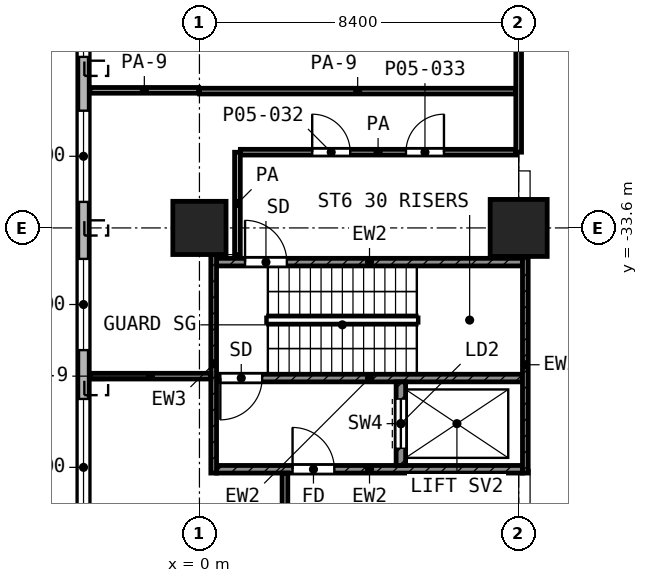
"""IFC4 building model, lengths in metres.
Left out: names, types, materials, properties, quantities, classifications, styles, units other than length and angle.
Written with IfcOpenShell. Run it as: python <this file> out.ifc"""

import sys

from ifc_helpers import new_model, si_unit, direction, frame, frame_2d, origin, origin_2d, place, context, subcontext, project, spatial, rectangle, extrude, element, fill, save


model = new_model("IFC4")
c1 = context("Model", 3, precision=1e-05, world=origin(), true_north=direction((0.0, 1.0)))
c2 = subcontext(c1, "Body", "Model", "MODEL_VIEW")
j1 = project(units=[si_unit("LENGTHUNIT", "METRE"), si_unit("PLANEANGLEUNIT", "RADIAN")], contexts=[c1])
p1 = place(None, origin())
s1 = spatial("IfcSite", under=j1, at=p1, CompositionType="ELEMENT")
p2 = place(p1, origin())
s2 = spatial("IfcBuilding", under=s1, at=p2, CompositionType="ELEMENT")
p3 = place(p2, frame((0.0, 0.0, 23.8)))
s3 = spatial("IfcBuildingStorey", under=s2, at=p3, CompositionType="ELEMENT", Elevation=23.8)
p4 = place(p3, frame((0.0, -33.6, 0.0), z_axis=(0.0, 0.0, 1.0), x_axis=(1.0, 0.0, 0.0)))
e1 = element("IfcColumn", 1, at=p4, inside=s3, PredefinedType="COLUMN", context=c2, shape_type="SweptSolid", body=[
    extrude(rectangle(XDim=1.4, YDim=1.4, at=origin_2d()), origin(), (0.0, 0.0, 1.0), 5.2),
])
p5 = place(p3, frame((8.4, -33.6, 0.0), z_axis=(0.0, 0.0, 1.0), x_axis=(1.0, 0.0, 0.0)))
e2 = element("IfcColumn", 2, at=p5, inside=s3, PredefinedType="COLUMN", context=c2, shape_type="SweptSolid", body=[
    extrude(rectangle(XDim=1.5, YDim=1.5, at=origin_2d()), origin(), (0.0, 0.0, 1.0), 5.2),
])
p6 = place(p3, frame((-3.05, -2.862, 0.0), z_axis=(0.0, 0.0, 1.0), x_axis=(0.0, -1.0, 0.0)))
e3 = element("IfcWall", 3, at=p6, inside=s3, PredefinedType="SOLIDWALL", context=c2, shape_type="SweptSolid", body=[
    extrude(rectangle(XDim=78.276, YDim=0.3, at=frame_2d((39.138, 0.0))), origin(), (0.0, 0.0, 1.0), 4.85),
])
p7 = place(p6, frame((1.638, 0.0, 0.9)))
e4 = element("IfcOpeningElement", 4, at=p7, cuts=e3, PredefinedType="OPENING", context=c2, shape_type="SweptSolid", body=[
    extrude(rectangle(XDim=3.6, YDim=3.0, at=frame_2d((1.8, 1.5))), frame((0.0, 0.16, 0.0), z_axis=(0.0, -1.0, 0.0), x_axis=(1.0, 0.0, 0.0)), (0.0, 0.0, 1.0), 0.32),
])
p8 = place(p6, frame((5.838, 0.0, 0.9)))
e5 = element("IfcOpeningElement", 5, at=p8, cuts=e3, PredefinedType="OPENING", context=c2, shape_type="SweptSolid", body=[
    extrude(rectangle(XDim=3.6, YDim=3.0, at=frame_2d((1.8, 1.5))), frame((0.0, 0.16, 0.0), z_axis=(0.0, -1.0, 0.0), x_axis=(1.0, 0.0, 0.0)), (0.0, 0.0, 1.0), 0.32),
])
p9 = place(p6, frame((10.038, 0.0, 0.9)))
e6 = element("IfcOpeningElement", 6, at=p9, cuts=e3, PredefinedType="OPENING", context=c2, shape_type="SweptSolid", body=[
    extrude(rectangle(XDim=3.6, YDim=3.0, at=frame_2d((1.8, 1.5))), frame((0.0, 0.16, 0.0), z_axis=(0.0, -1.0, 0.0), x_axis=(1.0, 0.0, 0.0)), (0.0, 0.0, 1.0), 0.32),
])
p10 = place(p6, frame((14.238, 0.0, 0.9)))
e7 = element("IfcOpeningElement", 7, at=p10, cuts=e3, PredefinedType="OPENING", context=c2, shape_type="SweptSolid", body=[
    extrude(rectangle(XDim=3.6, YDim=3.0, at=frame_2d((1.8, 1.5))), frame((0.0, 0.16, 0.0), z_axis=(0.0, -1.0, 0.0), x_axis=(1.0, 0.0, 0.0)), (0.0, 0.0, 1.0), 0.32),
])
p11 = place(p6, frame((18.438, 0.0, 0.9)))
e8 = element("IfcOpeningElement", 8, at=p11, cuts=e3, PredefinedType="OPENING", context=c2, shape_type="SweptSolid", body=[
    extrude(rectangle(XDim=3.6, YDim=3.0, at=frame_2d((1.8, 1.5))), frame((0.0, 0.16, 0.0), z_axis=(0.0, -1.0, 0.0), x_axis=(1.0, 0.0, 0.0)), (0.0, 0.0, 1.0), 0.32),
])
p12 = place(p6, frame((22.638, 0.0, 0.9)))
e9 = element("IfcOpeningElement", 9, at=p12, cuts=e3, PredefinedType="OPENING", context=c2, shape_type="SweptSolid", body=[
    extrude(rectangle(XDim=3.6, YDim=3.0, at=frame_2d((1.8, 1.5))), frame((0.0, 0.16, 0.0), z_axis=(0.0, -1.0, 0.0), x_axis=(1.0, 0.0, 0.0)), (0.0, 0.0, 1.0), 0.32),
])
p13 = place(p6, frame((27.653, 0.0, 0.9)))
e10 = element("IfcOpeningElement", 10, at=p13, cuts=e3, PredefinedType="OPENING", context=c2, shape_type="SweptSolid", body=[
    extrude(rectangle(XDim=2.4, YDim=3.0, at=frame_2d((1.2, 1.5))), frame((0.0, 0.16, 0.0), z_axis=(0.0, -1.0, 0.0), x_axis=(1.0, 0.0, 0.0)), (0.0, 0.0, 1.0), 0.32),
])
p14 = place(p6, frame((31.553, 0.0, 0.9)))
e11 = element("IfcOpeningElement", 11, at=p14, cuts=e3, PredefinedType="OPENING", context=c2, shape_type="SweptSolid", body=[
    extrude(rectangle(XDim=2.4, YDim=3.0, at=frame_2d((1.2, 1.5))), frame((0.0, 0.16, 0.0), z_axis=(0.0, -1.0, 0.0), x_axis=(1.0, 0.0, 0.0)), (0.0, 0.0, 1.0), 0.32),
])
p15 = place(p6, frame((35.238, 0.0, 0.9)))
e12 = element("IfcOpeningElement", 12, at=p15, cuts=e3, PredefinedType="OPENING", context=c2, shape_type="SweptSolid", body=[
    extrude(rectangle(XDim=3.6, YDim=3.0, at=frame_2d((1.8, 1.5))), frame((0.0, 0.16, 0.0), z_axis=(0.0, -1.0, 0.0), x_axis=(1.0, 0.0, 0.0)), (0.0, 0.0, 1.0), 0.32),
])
p16 = place(p6, frame((39.438, 0.0, 0.9)))
e13 = element("IfcOpeningElement", 13, at=p16, cuts=e3, PredefinedType="OPENING", context=c2, shape_type="SweptSolid", body=[
    extrude(rectangle(XDim=3.6, YDim=3.0, at=frame_2d((1.8, 1.5))), frame((0.0, 0.16, 0.0), z_axis=(0.0, -1.0, 0.0), x_axis=(1.0, 0.0, 0.0)), (0.0, 0.0, 1.0), 0.32),
])
p17 = place(p6, frame((44.323, 0.0, 0.9)))
e14 = element("IfcOpeningElement", 14, at=p17, cuts=e3, PredefinedType="OPENING", context=c2, shape_type="SweptSolid", body=[
    extrude(rectangle(XDim=2.4, YDim=3.0, at=frame_2d((1.2, 1.5))), frame((0.0, 0.16, 0.0), z_axis=(0.0, -1.0, 0.0), x_axis=(1.0, 0.0, 0.0)), (0.0, 0.0, 1.0), 0.32),
])
p18 = place(p6, frame((48.203, 0.0, 0.9)))
e15 = element("IfcOpeningElement", 15, at=p18, cuts=e3, PredefinedType="OPENING", context=c2, shape_type="SweptSolid", body=[
    extrude(rectangle(XDim=2.4, YDim=3.0, at=frame_2d((1.2, 1.5))), frame((0.0, 0.16, 0.0), z_axis=(0.0, -1.0, 0.0), x_axis=(1.0, 0.0, 0.0)), (0.0, 0.0, 1.0), 0.32),
])
p19 = place(p6, frame((52.038, 0.0, 0.9)))
e16 = element("IfcOpeningElement", 16, at=p19, cuts=e3, PredefinedType="OPENING", context=c2, shape_type="SweptSolid", body=[
    extrude(rectangle(XDim=3.6, YDim=3.0, at=frame_2d((1.8, 1.5))), frame((0.0, 0.16, 0.0), z_axis=(0.0, -1.0, 0.0), x_axis=(1.0, 0.0, 0.0)), (0.0, 0.0, 1.0), 0.32),
])
p20 = place(p6, frame((56.238, 0.0, 0.9)))
e17 = element("IfcOpeningElement", 17, at=p20, cuts=e3, PredefinedType="OPENING", context=c2, shape_type="SweptSolid", body=[
    extrude(rectangle(XDim=3.6, YDim=3.0, at=frame_2d((1.8, 1.5))), frame((0.0, 0.16, 0.0), z_axis=(0.0, -1.0, 0.0), x_axis=(1.0, 0.0, 0.0)), (0.0, 0.0, 1.0), 0.32),
])
p21 = place(p6, frame((60.438, 0.0, 0.9)))
e18 = element("IfcOpeningElement", 18, at=p21, cuts=e3, PredefinedType="OPENING", context=c2, shape_type="SweptSolid", body=[
    extrude(rectangle(XDim=3.6, YDim=3.0, at=frame_2d((1.8, 1.5))), frame((0.0, 0.16, 0.0), z_axis=(0.0, -1.0, 0.0), x_axis=(1.0, 0.0, 0.0)), (0.0, 0.0, 1.0), 0.32),
])
p22 = place(p6, frame((64.638, 0.0, 0.9)))
e19 = element("IfcOpeningElement", 19, at=p22, cuts=e3, PredefinedType="OPENING", context=c2, shape_type="SweptSolid", body=[
    extrude(rectangle(XDim=3.6, YDim=3.0, at=frame_2d((1.8, 1.5))), frame((0.0, 0.16, 0.0), z_axis=(0.0, -1.0, 0.0), x_axis=(1.0, 0.0, 0.0)), (0.0, 0.0, 1.0), 0.32),
])
p23 = place(p6, frame((69.238, 0.0, 0.9)))
e20 = element("IfcOpeningElement", 20, at=p23, cuts=e3, PredefinedType="OPENING", context=c2, shape_type="SweptSolid", body=[
    extrude(rectangle(XDim=1.2, YDim=3.0, at=frame_2d((0.6, 1.5))), frame((0.0, 0.16, 0.0), z_axis=(0.0, -1.0, 0.0), x_axis=(1.0, 0.0, 0.0)), (0.0, 0.0, 1.0), 0.32),
])
p24 = place(p6, frame((73.038, 0.0, 0.9)))
e21 = element("IfcOpeningElement", 21, at=p24, cuts=e3, PredefinedType="OPENING", context=c2, shape_type="SweptSolid", body=[
    extrude(rectangle(XDim=3.6, YDim=3.0, at=frame_2d((1.8, 1.5))), frame((0.0, 0.16, 0.0), z_axis=(0.0, -1.0, 0.0), x_axis=(1.0, 0.0, 0.0)), (0.0, 0.0, 1.0), 0.32),
])
p25 = place(p3, frame((0.375, -40.05, 0.0), z_axis=(0.0, 0.0, 1.0), x_axis=(0.0, 1.0, 0.0)))
e22 = element("IfcWall", 22, at=p25, inside=s3, PredefinedType="SHEAR", context=c2, shape_type="SweptSolid", body=[
    extrude(rectangle(XDim=5.75, YDim=0.15, at=frame_2d((2.875, 0.0))), origin(), (0.0, 0.0, 1.0), 4.85),
])
p26 = place(p3, frame((8.575, -40.05, 0.0), z_axis=(0.0, 0.0, 1.0), x_axis=(0.0, 1.0, 0.0)))
e23 = element("IfcWall", 23, at=p26, inside=s3, PredefinedType="SHEAR", context=c2, shape_type="SweptSolid", body=[
    extrude(rectangle(XDim=5.7, YDim=0.15, at=frame_2d((2.85, 0.0))), origin(), (0.0, 0.0, 1.0), 4.85),
])
p27 = place(p3, frame((0.45, -34.5, 0.0), z_axis=(0.0, 0.0, 1.0), x_axis=(1.0, 0.0, 0.0)))
e24 = element("IfcWall", 24, at=p27, inside=s3, PredefinedType="SHEAR", context=c2, shape_type="SweptSolid", body=[
    extrude(rectangle(XDim=8.05, YDim=0.2, at=frame_2d((4.025, 0.0))), origin(), (0.0, 0.0, 1.0), 4.85),
])
p28 = place(p27, frame((0.75, 0.0, 0.0)))
e25 = element("IfcOpeningElement", 25, at=p28, cuts=e24, PredefinedType="OPENING", context=c2, shape_type="SweptSolid", body=[
    extrude(rectangle(XDim=1.1, YDim=2.1, at=frame_2d((0.55, 1.05))), frame((0.0, 0.11, 0.0), z_axis=(0.0, -1.0, 0.0), x_axis=(1.0, 0.0, 0.0)), (0.0, 0.0, 1.0), 0.22),
])
p29 = place(p3, frame((0.45, -37.55, 0.0), z_axis=(0.0, 0.0, 1.0), x_axis=(1.0, 0.0, 0.0)))
e26 = element("IfcWall", 26, at=p29, inside=s3, PredefinedType="SHEAR", context=c2, shape_type="SweptSolid", body=[
    extrude(rectangle(XDim=8.05, YDim=0.2, at=frame_2d((4.025, 0.0))), origin(), (0.0, 0.0, 1.0), 4.85),
])
p30 = place(p29, frame((0.1, 0.0, 0.0)))
e27 = element("IfcOpeningElement", 27, at=p30, cuts=e26, PredefinedType="OPENING", context=c2, shape_type="SweptSolid", body=[
    extrude(rectangle(XDim=1.1, YDim=2.1, at=frame_2d((0.55, 1.05))), frame((0.0, 0.11, 0.0), z_axis=(0.0, -1.0, 0.0), x_axis=(1.0, 0.0, 0.0)), (0.0, 0.0, 1.0), 0.22),
])
p31 = place(p3, frame((0.45, -39.95, 0.0), z_axis=(0.0, 0.0, 1.0), x_axis=(1.0, 0.0, 0.0)))
e28 = element("IfcWall", 28, at=p31, inside=s3, PredefinedType="SHEAR", context=c2, shape_type="SweptSolid", body=[
    extrude(rectangle(XDim=8.05, YDim=0.2, at=frame_2d((4.025, 0.0))), origin(), (0.0, 0.0, 1.0), 4.85),
])
p32 = place(p31, frame((2.0, 0.0, 0.0)))
e29 = element("IfcOpeningElement", 29, at=p32, cuts=e28, PredefinedType="OPENING", context=c2, shape_type="SweptSolid", body=[
    extrude(rectangle(XDim=1.1, YDim=2.1, at=frame_2d((0.55, 1.05))), frame((0.0, 0.11, 0.0), z_axis=(0.0, -1.0, 0.0), x_axis=(1.0, 0.0, 0.0)), (0.0, 0.0, 1.0), 0.22),
])
p33 = place(p3, frame((5.3, -39.85, 0.0), z_axis=(0.0, 0.0, 1.0), x_axis=(0.0, 1.0, 0.0)))
e30 = element("IfcWall", 30, at=p33, inside=s3, PredefinedType="SHEAR", context=c2, shape_type="SweptSolid", body=[
    extrude(rectangle(XDim=2.2, YDim=0.25, at=frame_2d((1.1, 0.0))), origin(), (0.0, 0.0, 1.0), 4.85),
])
p34 = place(p33, frame((0.45, 0.0, 0.0)))
e31 = element("IfcOpeningElement", 31, at=p34, cuts=e30, PredefinedType="OPENING", context=c2, shape_type="SweptSolid", body=[
    extrude(rectangle(XDim=1.3, YDim=2.1, at=frame_2d((0.65, 1.05))), frame((0.0, 0.135, 0.0), z_axis=(0.0, -1.0, 0.0), x_axis=(1.0, 0.0, 0.0)), (0.0, 0.0, 1.0), 0.27),
])
p35 = place(p3, frame((-2.88, -37.5, 0.0), z_axis=(0.0, 0.0, 1.0), x_axis=(1.0, 0.0, 0.0)))
e32 = element("IfcWall", 32, at=p35, inside=s3, PredefinedType="PARTITIONING", context=c2, shape_type="SweptSolid", body=[
    extrude(rectangle(XDim=3.18, YDim=0.15, at=frame_2d((1.59, 0.0))), origin(), (0.0, 0.0, 1.0), 3.45),
])
p36 = place(p3, frame((1.076, -31.607, 0.0), z_axis=(0.0, 0.0, 1.0), x_axis=(1.0, 0.0, 0.0)))
e33 = element("IfcWall", 33, at=p36, inside=s3, PredefinedType="PARTITIONING", context=c2, shape_type="SweptSolid", body=[
    extrude(rectangle(XDim=7.249, YDim=0.15, at=frame_2d((3.625, 0.0))), origin(), (0.0, 0.0, 1.0), 4.85),
])
p37 = place(p36, frame((1.891, 0.0, 0.0)))
e34 = element("IfcOpeningElement", 34, at=p37, cuts=e33, PredefinedType="OPENING", context=c2, shape_type="SweptSolid", body=[
    extrude(rectangle(XDim=1.0, YDim=2.1, at=frame_2d((0.5, 1.05))), frame((0.0, 0.085, 0.0), z_axis=(0.0, -1.0, 0.0), x_axis=(1.0, 0.0, 0.0)), (0.0, 0.0, 1.0), 0.17),
])
p38 = place(p36, frame((4.358, 0.0, 0.0)))
e35 = element("IfcOpeningElement", 35, at=p38, cuts=e33, PredefinedType="OPENING", context=c2, shape_type="SweptSolid", body=[
    extrude(rectangle(XDim=1.0, YDim=2.1, at=frame_2d((0.5, 1.05))), frame((0.0, 0.085, 0.0), z_axis=(0.0, -1.0, 0.0), x_axis=(1.0, 0.0, 0.0)), (0.0, 0.0, 1.0), 0.17),
])
p39 = place(p3, frame((0.002, -30.0, 0.0), z_axis=(0.0, 0.0, 1.0), x_axis=(1.0, 0.0, 0.0)))
e36 = element("IfcWall", 36, at=p39, inside=s3, PredefinedType="PARTITIONING", context=c2, shape_type="SweptSolid", body=[
    extrude(rectangle(XDim=8.323, YDim=0.15, at=frame_2d((4.162, 0.0))), origin(), (0.0, 0.0, 1.0), 3.45),
])
p40 = place(p3, frame((-2.88, -29.98, 0.0), z_axis=(0.0, 0.0, 1.0), x_axis=(1.0, 0.0, 0.0)))
e37 = element("IfcWall", 37, at=p40, inside=s3, PredefinedType="PARTITIONING", context=c2, shape_type="SweptSolid", body=[
    extrude(rectangle(XDim=2.86, YDim=0.15, at=frame_2d((1.43, 0.0))), origin(), (0.0, 0.0, 1.0), 3.45),
])
p41 = place(p3, frame((1.0, -34.303, 0.0), z_axis=(0.0, 0.0, 1.0), x_axis=(0.0, 1.0, 0.0)))
e38 = element("IfcWall", 38, at=p41, inside=s3, PredefinedType="PARTITIONING", context=c2, shape_type="SweptSolid", body=[
    extrude(rectangle(XDim=2.694, YDim=0.15, at=frame_2d((1.347, 0.0))), origin(), (0.0, 0.0, 1.0), 4.85),
])
p42 = place(p3, frame((2.25, -42.348, 0.0), z_axis=(0.0, 0.0, 1.0), x_axis=(0.0, 1.0, 0.0)))
e39 = element("IfcWall", 39, at=p42, inside=s3, PredefinedType="PARTITIONING", context=c2, shape_type="SweptSolid", body=[
    extrude(rectangle(XDim=2.298, YDim=0.15, at=frame_2d((1.149, 0.0))), origin(), (0.0, 0.0, 1.0), 4.85),
])
p43 = place(p3, frame((8.4, -31.607, 0.0), z_axis=(0.0, 0.0, 1.0), x_axis=(0.0, 1.0, 0.0)))
e40 = element("IfcWall", 40, at=p43, inside=s3, PredefinedType="PARTITIONING", context=c2, shape_type="SweptSolid", body=[
    extrude(rectangle(XDim=6.407, YDim=0.15, at=frame_2d((3.204, 0.0))), origin(), (0.0, 0.0, 1.0), 4.85),
])
p44 = place(p43, frame((3.557, 0.0, 0.0)))
e41 = element("IfcOpeningElement", 41, at=p44, cuts=e40, PredefinedType="OPENING", context=c2, shape_type="SweptSolid", body=[
    extrude(rectangle(XDim=0.9, YDim=2.1, at=frame_2d((0.45, 1.05))), frame((0.0, 0.085, 0.0), z_axis=(0.0, -1.0, 0.0), x_axis=(1.0, 0.0, 0.0)), (0.0, 0.0, 1.0), 0.17),
])
p45 = place(p12, origin())
e42 = element("IfcWindow", 42, at=p45, inside=s3, PartitioningType="SINGLE_PANEL", PredefinedType="WINDOW", context=c2, shape_type="SweptSolid", body=[
    extrude(rectangle(XDim=3.6, YDim=3.0, at=frame_2d((1.8, 1.5))), frame((0.0, 0.03, 0.0), z_axis=(0.0, -1.0, 0.0), x_axis=(1.0, 0.0, 0.0)), (0.0, 0.0, 1.0), 0.06),
])
fill(e9, e42)
p46 = place(p13, origin())
e43 = element("IfcWindow", 43, at=p46, inside=s3, PartitioningType="SINGLE_PANEL", PredefinedType="WINDOW", context=c2, shape_type="SweptSolid", body=[
    extrude(rectangle(XDim=2.4, YDim=3.0, at=frame_2d((1.2, 1.5))), frame((0.0, 0.03, 0.0), z_axis=(0.0, -1.0, 0.0), x_axis=(1.0, 0.0, 0.0)), (0.0, 0.0, 1.0), 0.06),
])
fill(e10, e43)
p47 = place(p14, origin())
e44 = element("IfcWindow", 44, at=p47, inside=s3, PartitioningType="SINGLE_PANEL", PredefinedType="WINDOW", context=c2, shape_type="SweptSolid", body=[
    extrude(rectangle(XDim=2.4, YDim=3.0, at=frame_2d((1.2, 1.5))), frame((0.0, 0.03, 0.0), z_axis=(0.0, -1.0, 0.0), x_axis=(1.0, 0.0, 0.0)), (0.0, 0.0, 1.0), 0.06),
])
fill(e11, e44)
p48 = place(p15, origin())
e45 = element("IfcWindow", 45, at=p48, inside=s3, PartitioningType="SINGLE_PANEL", PredefinedType="WINDOW", context=c2, shape_type="SweptSolid", body=[
    extrude(rectangle(XDim=3.6, YDim=3.0, at=frame_2d((1.8, 1.5))), frame((0.0, 0.03, 0.0), z_axis=(0.0, -1.0, 0.0), x_axis=(1.0, 0.0, 0.0)), (0.0, 0.0, 1.0), 0.06),
])
fill(e12, e45)
p49 = place(p28, origin())
e46 = element("IfcDoor", 46, at=p49, inside=s3, OperationType="SINGLE_SWING_LEFT", PredefinedType="DOOR", context=c2, shape_type="SweptSolid", body=[
    extrude(rectangle(XDim=1.1, YDim=2.1, at=frame_2d((0.55, 1.05))), frame((0.0, 0.025, 0.0), z_axis=(0.0, -1.0, 0.0), x_axis=(1.0, 0.0, 0.0)), (0.0, 0.0, 1.0), 0.05),
])
fill(e25, e46)
p50 = place(p30, frame((1.1, 0.0, 0.0), z_axis=(0.0, 0.0, 1.0), x_axis=(-1.0, 0.0, 0.0)))
e47 = element("IfcDoor", 47, at=p50, inside=s3, OperationType="SINGLE_SWING_LEFT", PredefinedType="DOOR", context=c2, shape_type="SweptSolid", body=[
    extrude(rectangle(XDim=1.1, YDim=2.1, at=frame_2d((0.55, 1.05))), frame((0.0, 0.025, 0.0), z_axis=(0.0, -1.0, 0.0), x_axis=(1.0, 0.0, 0.0)), (0.0, 0.0, 1.0), 0.05),
])
fill(e27, e47)
p51 = place(p34, origin())
e48 = element("IfcDoor", 48, at=p51, inside=s3, OperationType="DOUBLE_DOOR_SLIDING", PredefinedType="DOOR", context=c2, shape_type="SweptSolid", body=[
    extrude(rectangle(XDim=1.3, YDim=2.1, at=frame_2d((0.65, 1.05))), frame((0.0, 0.025, 0.0), z_axis=(0.0, -1.0, 0.0), x_axis=(1.0, 0.0, 0.0)), (0.0, 0.0, 1.0), 0.05),
])
fill(e31, e48)
p52 = place(p32, origin())
e49 = element("IfcDoor", 49, at=p52, inside=s3, OperationType="SINGLE_SWING_LEFT", PredefinedType="DOOR", context=c2, shape_type="SweptSolid", body=[
    extrude(rectangle(XDim=1.1, YDim=2.1, at=frame_2d((0.55, 1.05))), frame((0.0, 0.025, 0.0), z_axis=(0.0, -1.0, 0.0), x_axis=(1.0, 0.0, 0.0)), (0.0, 0.0, 1.0), 0.05),
])
fill(e29, e49)
p53 = place(p37, origin())
e50 = element("IfcDoor", 50, at=p53, inside=s3, OperationType="SINGLE_SWING_LEFT", PredefinedType="DOOR", context=c2, shape_type="SweptSolid", body=[
    extrude(rectangle(XDim=1.0, YDim=2.1, at=frame_2d((0.5, 1.05))), frame((0.0, 0.025, 0.0), z_axis=(0.0, -1.0, 0.0), x_axis=(1.0, 0.0, 0.0)), (0.0, 0.0, 1.0), 0.05),
])
fill(e34, e50)
p54 = place(p38, origin())
e51 = element("IfcDoor", 51, at=p54, inside=s3, OperationType="SINGLE_SWING_RIGHT", PredefinedType="DOOR", context=c2, shape_type="SweptSolid", body=[
    extrude(rectangle(XDim=1.0, YDim=2.1, at=frame_2d((0.5, 1.05))), frame((0.0, 0.025, 0.0), z_axis=(0.0, -1.0, 0.0), x_axis=(1.0, 0.0, 0.0)), (0.0, 0.0, 1.0), 0.05),
])
fill(e35, e51)
save(model, sys.argv[1])
